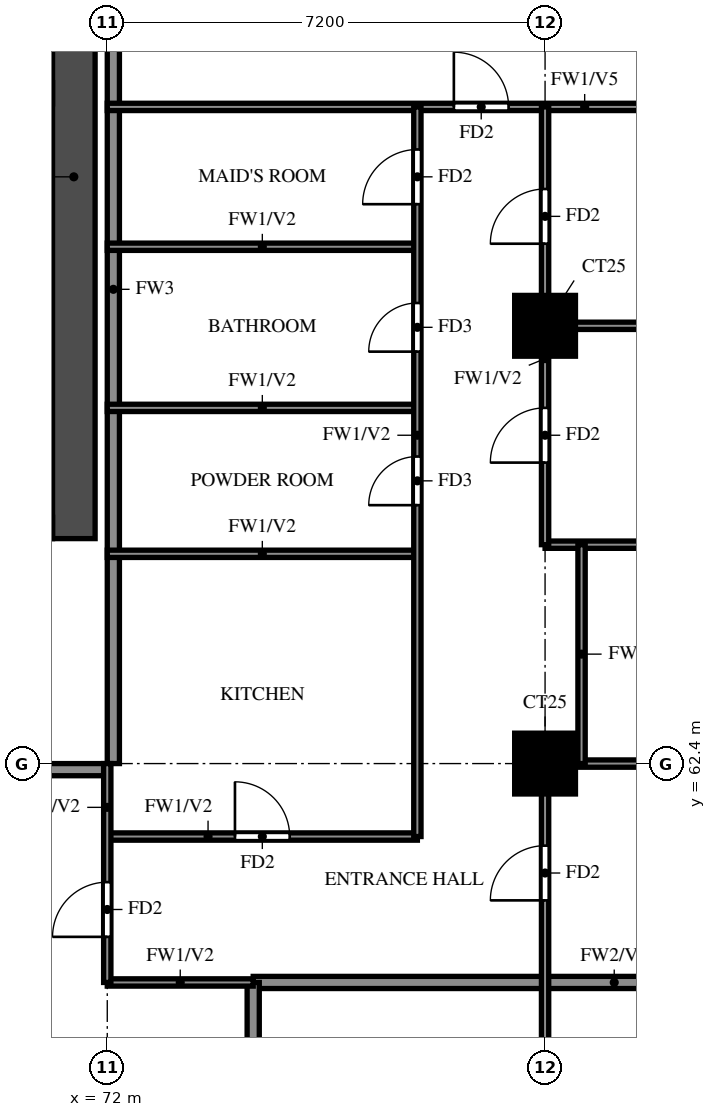
"""IFC4 building model, lengths in metres.
Left out: names, types, materials, properties, quantities, classifications, styles, units other than length and angle.
Written with IfcOpenShell. Run it as: python <this file> out.ifc"""

import sys

from ifc_helpers import new_model, si_unit, direction, frame, frame_2d, origin, origin_2d, place, context, subcontext, project, spatial, rectangle, extrude, source, transform, mapped, element, fill, save


model = new_model("IFC4")
c1 = context("Model", 3, precision=1e-05, world=origin(), true_north=direction((0.0, 1.0)))
c2 = subcontext(c1, "Body", "Model", "MODEL_VIEW")
j1 = project(units=[si_unit("LENGTHUNIT", "METRE"), si_unit("PLANEANGLEUNIT", "RADIAN")], contexts=[c1])
p1 = place(None, origin())
s1 = spatial("IfcSite", under=j1, at=p1, CompositionType="ELEMENT")
p2 = place(p1, origin())
s2 = spatial("IfcBuilding", under=s1, at=p2, CompositionType="ELEMENT")
p3 = place(p2, frame((0.0, 0.0, 146.5)))
s3 = spatial("IfcBuildingStorey", under=s2, at=p3, CompositionType="ELEMENT", Elevation=146.5)
m1 = source(origin(), c2, "Body", "SweptSolid", [
    extrude(rectangle(XDim=1.0, YDim=1.0, at=origin_2d()), origin(), (0.0, 0.0, 1.0), 3.2),
])
for number, where, z_axis, x_axis in (
    (1, (79.2, 62.4, 0.0), (0.0, 0.0, 1.0), (1.0, 0.0, 0.0)),
    (2, (79.2, 69.6, 0.0), (0.0, 0.0, 1.0), (1.0, 0.0, 0.0)),
):
    element("IfcColumn", number, at=place(p3, frame(where, z_axis=z_axis, x_axis=x_axis)), inside=s3, PredefinedType="COLUMN", context=c2, shape_type="MappedRepresentation", body=[
        mapped(m1, transform((0.0, 0.0, 0.0))),
    ])
p4 = place(p3, frame((71.45, 66.1, 0.0), z_axis=(0.0, 0.0, 1.0), x_axis=(0.0, 1.0, 0.0)))
e3 = element("IfcWall", 3, at=p4, inside=s3, PredefinedType="SHEAR", context=c2, shape_type="SweptSolid", body=[
    extrude(rectangle(XDim=11.9, YDim=0.7, at=frame_2d((5.95, 0.0))), origin(), (0.0, 0.0, 1.0), 3.2),
])
p5 = place(p3, frame((29.7, 66.275, 0.0), z_axis=(0.0, 0.0, 1.0), x_axis=(1.0, 0.0, 0.0)))
e4 = element("IfcWall", 4, at=p5, inside=s3, PredefinedType="SHEAR", context=c2, shape_type="SweptSolid", body=[
    extrude(rectangle(XDim=41.4, YDim=0.35, at=frame_2d((20.7, 0.0))), origin(), (0.0, 0.0, 1.0), 3.2),
])
p6 = place(p5, frame((0.925, 0.0, 0.0)))
e5 = element("IfcOpeningElement", 5, at=p6, cuts=e4, PredefinedType="OPENING", context=c2, shape_type="SweptSolid", body=[
    extrude(rectangle(XDim=1.1, YDim=2.1, at=frame_2d((0.55, 1.05))), frame((0.0, 0.185, 0.0), z_axis=(0.0, -1.0, 0.0), x_axis=(1.0, 0.0, 0.0)), (0.0, 0.0, 1.0), 0.37),
])
p7 = place(p5, frame((3.712, 0.0, 0.0)))
e6 = element("IfcOpeningElement", 6, at=p7, cuts=e4, PredefinedType="OPENING", context=c2, shape_type="SweptSolid", body=[
    extrude(rectangle(XDim=1.8, YDim=2.1, at=frame_2d((0.9, 1.05))), frame((0.0, 0.185, 0.0), z_axis=(0.0, -1.0, 0.0), x_axis=(1.0, 0.0, 0.0)), (0.0, 0.0, 1.0), 0.37),
])
p8 = place(p3, frame((67.2, 62.3, 0.0), z_axis=(0.0, 0.0, 1.0), x_axis=(1.0, 0.0, 0.0)))
e7 = element("IfcWall", 7, at=p8, inside=s3, PredefinedType="SOLIDWALL", context=c2, shape_type="SweptSolid", body=[
    extrude(rectangle(XDim=4.8, YDim=0.2, at=frame_2d((2.4, 0.0))), origin(), (0.0, 0.0, 1.0), 3.2),
])
p9 = place(p3, frame((72.1, 62.4, 0.0), z_axis=(0.0, 0.0, 1.0), x_axis=(0.0, 1.0, 0.0)))
e8 = element("IfcWall", 8, at=p9, inside=s3, PredefinedType="SOLIDWALL", context=c2, shape_type="SweptSolid", body=[
    extrude(rectangle(XDim=15.6, YDim=0.2, at=frame_2d((7.8, 0.0))), origin(), (0.0, 0.0, 1.0), 3.2),
])
p10 = place(p3, frame((74.4, 58.8, 0.0), z_axis=(0.0, 0.0, 1.0), x_axis=(1.0, 0.0, 0.0)))
e9 = element("IfcWall", 9, at=p10, inside=s3, PredefinedType="SOLIDWALL", context=c2, shape_type="SweptSolid", body=[
    extrude(rectangle(XDim=11.875, YDim=0.2, at=frame_2d((5.938, 0.0))), origin(), (0.0, 0.0, 1.0), 2.3),
])
p11 = place(p3, frame((74.4, 56.4, 0.0), z_axis=(0.0, 0.0, 1.0), x_axis=(0.0, 1.0, 0.0)))
e10 = element("IfcWall", 10, at=p11, inside=s3, PredefinedType="SOLIDWALL", context=c2, shape_type="SweptSolid", body=[
    extrude(rectangle(XDim=2.4, YDim=0.2, at=frame_2d((1.2, 0.0))), origin(), (0.0, 0.0, 1.0), 3.2),
])
p12 = place(p3, frame((72.0, 58.8, 0.0), z_axis=(0.0, 0.0, 1.0), x_axis=(1.0, 0.0, 0.0)))
e11 = element("IfcWall", 11, at=p12, inside=s3, PredefinedType="PARTITIONING", context=c2, shape_type="SweptSolid", body=[
    extrude(rectangle(XDim=2.4, YDim=0.12, at=frame_2d((1.2, 0.0))), origin(), (0.0, 0.0, 1.0), 3.2),
])
p13 = place(p3, frame((72.0, 61.2, 0.0), z_axis=(0.0, 0.0, 1.0), x_axis=(1.0, 0.0, 0.0)))
e12 = element("IfcWall", 12, at=p13, inside=s3, PredefinedType="PARTITIONING", context=c2, shape_type="SweptSolid", body=[
    extrude(rectangle(XDim=5.1, YDim=0.12, at=frame_2d((2.55, 0.0))), origin(), (0.0, 0.0, 1.0), 3.2),
])
p14 = place(p13, frame((2.1, 0.0, 0.0)))
e13 = element("IfcOpeningElement", 13, at=p14, cuts=e12, PredefinedType="OPENING", context=c2, shape_type="SweptSolid", body=[
    extrude(rectangle(XDim=0.9, YDim=2.1, at=frame_2d((0.45, 1.05))), frame((0.0, 0.07, 0.0), z_axis=(0.0, -1.0, 0.0), x_axis=(1.0, 0.0, 0.0)), (0.0, 0.0, 1.0), 0.14),
])
p15 = place(p3, frame((79.2, 62.4, 0.0), z_axis=(0.0, 0.0, 1.0), x_axis=(1.0, 0.0, 0.0)))
e14 = element("IfcWall", 14, at=p15, inside=s3, PredefinedType="PARTITIONING", context=c2, shape_type="SweptSolid", body=[
    extrude(rectangle(XDim=7.075, YDim=0.12, at=frame_2d((3.538, 0.0))), origin(), (0.0, 0.0, 1.0), 3.2),
])
p16 = place(p15, frame((3.438, 0.0, 0.0)))
e15 = element("IfcOpeningElement", 15, at=p16, cuts=e14, PredefinedType="OPENING", context=c2, shape_type="SweptSolid", body=[
    extrude(rectangle(XDim=0.8, YDim=2.1, at=frame_2d((0.4, 1.05))), frame((0.0, 0.07, 0.0), z_axis=(0.0, -1.0, 0.0), x_axis=(1.0, 0.0, 0.0)), (0.0, 0.0, 1.0), 0.14),
])
p17 = place(p3, frame((72.0, 65.85, 0.0), z_axis=(0.0, 0.0, 1.0), x_axis=(1.0, 0.0, 0.0)))
e16 = element("IfcWall", 16, at=p17, inside=s3, PredefinedType="PARTITIONING", context=c2, shape_type="SweptSolid", body=[
    extrude(rectangle(XDim=5.1, YDim=0.12, at=frame_2d((2.55, 0.0))), origin(), (0.0, 0.0, 1.0), 3.2),
])
p18 = place(p3, frame((79.2, 66.0, 0.0), z_axis=(0.0, 0.0, 1.0), x_axis=(1.0, 0.0, 0.0)))
e17 = element("IfcWall", 17, at=p18, inside=s3, PredefinedType="PARTITIONING", context=c2, shape_type="SweptSolid", body=[
    extrude(rectangle(XDim=7.075, YDim=0.12, at=frame_2d((3.538, 0.0))), origin(), (0.0, 0.0, 1.0), 2.3),
])
p19 = place(p3, frame((72.0, 68.25, 0.0), z_axis=(0.0, 0.0, 1.0), x_axis=(1.0, 0.0, 0.0)))
e18 = element("IfcWall", 18, at=p19, inside=s3, PredefinedType="PARTITIONING", context=c2, shape_type="SweptSolid", body=[
    extrude(rectangle(XDim=5.1, YDim=0.12, at=frame_2d((2.55, 0.0))), origin(), (0.0, 0.0, 1.0), 3.2),
])
p20 = place(p3, frame((79.2, 69.6, 0.0), z_axis=(0.0, 0.0, 1.0), x_axis=(1.0, 0.0, 0.0)))
e19 = element("IfcWall", 19, at=p20, inside=s3, PredefinedType="PARTITIONING", context=c2, shape_type="SweptSolid", body=[
    extrude(rectangle(XDim=7.075, YDim=0.12, at=frame_2d((3.538, 0.0))), origin(), (0.0, 0.0, 1.0), 3.2),
])
p21 = place(p3, frame((72.0, 70.9, 0.0), z_axis=(0.0, 0.0, 1.0), x_axis=(1.0, 0.0, 0.0)))
e20 = element("IfcWall", 20, at=p21, inside=s3, PredefinedType="PARTITIONING", context=c2, shape_type="SweptSolid", body=[
    extrude(rectangle(XDim=5.1, YDim=0.12, at=frame_2d((2.55, 0.0))), origin(), (0.0, 0.0, 1.0), 3.2),
])
p22 = place(p3, frame((72.0, 73.2, 0.0), z_axis=(0.0, 0.0, 1.0), x_axis=(1.0, 0.0, 0.0)))
e21 = element("IfcWall", 21, at=p22, inside=s3, PredefinedType="PARTITIONING", context=c2, shape_type="SweptSolid", body=[
    extrude(rectangle(XDim=14.275, YDim=0.12, at=frame_2d((7.137, 0.0))), origin(), (0.0, 0.0, 1.0), 2.3),
])
p23 = place(p22, frame((5.7, 0.0, 0.0)))
e22 = element("IfcOpeningElement", 22, at=p23, cuts=e21, PredefinedType="OPENING", context=c2, shape_type="SweptSolid", body=[
    extrude(rectangle(XDim=0.9, YDim=2.1, at=frame_2d((0.45, 1.05))), frame((0.0, 0.07, 0.0), z_axis=(0.0, -1.0, 0.0), x_axis=(1.0, 0.0, 0.0)), (0.0, 0.0, 1.0), 0.14),
])
p24 = place(p3, frame((72.0, 58.8, 0.0), z_axis=(0.0, 0.0, 1.0), x_axis=(0.0, 1.0, 0.0)))
e23 = element("IfcWall", 23, at=p24, inside=s3, PredefinedType="PARTITIONING", context=c2, shape_type="SweptSolid", body=[
    extrude(rectangle(XDim=3.6, YDim=0.12, at=frame_2d((1.8, 0.0))), origin(), (0.0, 0.0, 1.0), 3.2),
])
p25 = place(p24, frame((0.75, 0.0, 0.0)))
e24 = element("IfcOpeningElement", 24, at=p25, cuts=e23, PredefinedType="OPENING", context=c2, shape_type="SweptSolid", body=[
    extrude(rectangle(XDim=0.9, YDim=2.1, at=frame_2d((0.45, 1.05))), frame((0.0, 0.07, 0.0), z_axis=(0.0, -1.0, 0.0), x_axis=(1.0, 0.0, 0.0)), (0.0, 0.0, 1.0), 0.14),
])
p26 = place(p3, frame((77.1, 61.2, 0.0), z_axis=(0.0, 0.0, 1.0), x_axis=(0.0, 1.0, 0.0)))
e25 = element("IfcWall", 25, at=p26, inside=s3, PredefinedType="PARTITIONING", context=c2, shape_type="SweptSolid", body=[
    extrude(rectangle(XDim=12.0, YDim=0.12, at=frame_2d((6.0, 0.0))), origin(), (0.0, 0.0, 1.0), 3.2),
])
p27 = place(p26, frame((5.45, 0.0, 0.0)))
e26 = element("IfcOpeningElement", 26, at=p27, cuts=e25, PredefinedType="OPENING", context=c2, shape_type="SweptSolid", body=[
    extrude(rectangle(XDim=0.8, YDim=2.1, at=frame_2d((0.4, 1.05))), frame((0.0, 0.07, 0.0), z_axis=(0.0, -1.0, 0.0), x_axis=(1.0, 0.0, 0.0)), (0.0, 0.0, 1.0), 0.14),
])
p28 = place(p26, frame((7.975, 0.0, 0.0)))
e27 = element("IfcOpeningElement", 27, at=p28, cuts=e25, PredefinedType="OPENING", context=c2, shape_type="SweptSolid", body=[
    extrude(rectangle(XDim=0.8, YDim=2.1, at=frame_2d((0.4, 1.05))), frame((0.0, 0.07, 0.0), z_axis=(0.0, -1.0, 0.0), x_axis=(1.0, 0.0, 0.0)), (0.0, 0.0, 1.0), 0.14),
])
p29 = place(p26, frame((10.4, 0.0, 0.0)))
e28 = element("IfcOpeningElement", 28, at=p29, cuts=e25, PredefinedType="OPENING", context=c2, shape_type="SweptSolid", body=[
    extrude(rectangle(XDim=0.9, YDim=2.1, at=frame_2d((0.45, 1.05))), frame((0.0, 0.07, 0.0), z_axis=(0.0, -1.0, 0.0), x_axis=(1.0, 0.0, 0.0)), (0.0, 0.0, 1.0), 0.14),
])
p30 = place(p3, frame((79.2, 48.125, 0.0), z_axis=(0.0, 0.0, 1.0), x_axis=(0.0, 1.0, 0.0)))
e29 = element("IfcWall", 29, at=p30, inside=s3, PredefinedType="PARTITIONING", context=c2, shape_type="SweptSolid", body=[
    extrude(rectangle(XDim=14.275, YDim=0.12, at=frame_2d((7.137, 0.0))), origin(), (0.0, 0.0, 1.0), 3.2),
])
p31 = place(p30, frame((1.288, 0.0, 0.0)))
e30 = element("IfcOpeningElement", 30, at=p31, cuts=e29, PredefinedType="OPENING", context=c2, shape_type="SweptSolid", body=[
    extrude(rectangle(XDim=0.9, YDim=2.1, at=frame_2d((0.45, 1.05))), frame((0.0, 0.07, 0.0), z_axis=(0.0, -1.0, 0.0), x_axis=(1.0, 0.0, 0.0)), (0.0, 0.0, 1.0), 0.14),
])
p32 = place(p30, frame((7.825, 0.0, 0.0)))
e31 = element("IfcOpeningElement", 31, at=p32, cuts=e29, PredefinedType="OPENING", context=c2, shape_type="SweptSolid", body=[
    extrude(rectangle(XDim=1.5, YDim=2.1, at=frame_2d((0.75, 1.05))), frame((0.0, 0.07, 0.0), z_axis=(0.0, -1.0, 0.0), x_axis=(1.0, 0.0, 0.0)), (0.0, 0.0, 1.0), 0.14),
])
p33 = place(p30, frame((12.025, 0.0, 0.0)))
e32 = element("IfcOpeningElement", 32, at=p33, cuts=e29, PredefinedType="OPENING", context=c2, shape_type="SweptSolid", body=[
    extrude(rectangle(XDim=0.9, YDim=2.1, at=frame_2d((0.45, 1.05))), frame((0.0, 0.07, 0.0), z_axis=(0.0, -1.0, 0.0), x_axis=(1.0, 0.0, 0.0)), (0.0, 0.0, 1.0), 0.14),
])
p34 = place(p3, frame((79.2, 66.0, 0.0), z_axis=(0.0, 0.0, 1.0), x_axis=(0.0, 1.0, 0.0)))
e33 = element("IfcWall", 33, at=p34, inside=s3, PredefinedType="PARTITIONING", context=c2, shape_type="SweptSolid", body=[
    extrude(rectangle(XDim=7.2, YDim=0.12, at=frame_2d((3.6, 0.0))), origin(), (0.0, 0.0, 1.0), 3.2),
])
p35 = place(p34, frame((1.35, 0.0, 0.0)))
e34 = element("IfcOpeningElement", 34, at=p35, cuts=e33, PredefinedType="OPENING", context=c2, shape_type="SweptSolid", body=[
    extrude(rectangle(XDim=0.9, YDim=2.1, at=frame_2d((0.45, 1.05))), frame((0.0, 0.07, 0.0), z_axis=(0.0, -1.0, 0.0), x_axis=(1.0, 0.0, 0.0)), (0.0, 0.0, 1.0), 0.14),
])
p36 = place(p34, frame((4.95, 0.0, 0.0)))
e35 = element("IfcOpeningElement", 35, at=p36, cuts=e33, PredefinedType="OPENING", context=c2, shape_type="SweptSolid", body=[
    extrude(rectangle(XDim=0.9, YDim=2.1, at=frame_2d((0.45, 1.05))), frame((0.0, 0.07, 0.0), z_axis=(0.0, -1.0, 0.0), x_axis=(1.0, 0.0, 0.0)), (0.0, 0.0, 1.0), 0.14),
])
p37 = place(p3, frame((79.8, 62.4, 0.0), z_axis=(0.0, 0.0, 1.0), x_axis=(0.0, 1.0, 0.0)))
e36 = element("IfcWall", 36, at=p37, inside=s3, PredefinedType="PARTITIONING", context=c2, shape_type="SweptSolid", body=[
    extrude(rectangle(XDim=3.6, YDim=0.12, at=frame_2d((1.8, 0.0))), origin(), (0.0, 0.0, 1.0), 3.2),
])
p38 = place(p25, origin())
e37 = element("IfcDoor", 37, at=p38, inside=s3, OperationType="SINGLE_SWING_LEFT", PredefinedType="DOOR", context=c2, shape_type="SweptSolid", body=[
    extrude(rectangle(XDim=0.9, YDim=2.1, at=frame_2d((0.45, 1.05))), frame((0.0, 0.025, 0.0), z_axis=(0.0, -1.0, 0.0), x_axis=(1.0, 0.0, 0.0)), (0.0, 0.0, 1.0), 0.05),
])
fill(e24, e37)
p39 = place(p33, origin())
e38 = element("IfcDoor", 38, at=p39, inside=s3, OperationType="SINGLE_SWING_RIGHT", PredefinedType="DOOR", context=c2, shape_type="SweptSolid", body=[
    extrude(rectangle(XDim=0.9, YDim=2.1, at=frame_2d((0.45, 1.05))), frame((0.0, 0.025, 0.0), z_axis=(0.0, -1.0, 0.0), x_axis=(1.0, 0.0, 0.0)), (0.0, 0.0, 1.0), 0.05),
])
fill(e32, e38)
p40 = place(p35, origin())
e39 = element("IfcDoor", 39, at=p40, inside=s3, OperationType="SINGLE_SWING_LEFT", PredefinedType="DOOR", context=c2, shape_type="SweptSolid", body=[
    extrude(rectangle(XDim=0.9, YDim=2.1, at=frame_2d((0.45, 1.05))), frame((0.0, 0.025, 0.0), z_axis=(0.0, -1.0, 0.0), x_axis=(1.0, 0.0, 0.0)), (0.0, 0.0, 1.0), 0.05),
])
fill(e34, e39)
p41 = place(p36, origin())
e40 = element("IfcDoor", 40, at=p41, inside=s3, OperationType="SINGLE_SWING_RIGHT", PredefinedType="DOOR", context=c2, shape_type="SweptSolid", body=[
    extrude(rectangle(XDim=0.9, YDim=2.1, at=frame_2d((0.45, 1.05))), frame((0.0, 0.025, 0.0), z_axis=(0.0, -1.0, 0.0), x_axis=(1.0, 0.0, 0.0)), (0.0, 0.0, 1.0), 0.05),
])
fill(e35, e40)
p42 = place(p23, origin())
e41 = element("IfcDoor", 41, at=p42, inside=s3, OperationType="SINGLE_SWING_LEFT", PredefinedType="DOOR", context=c2, shape_type="SweptSolid", body=[
    extrude(rectangle(XDim=0.9, YDim=2.1, at=frame_2d((0.45, 1.05))), frame((0.0, 0.025, 0.0), z_axis=(0.0, -1.0, 0.0), x_axis=(1.0, 0.0, 0.0)), (0.0, 0.0, 1.0), 0.05),
])
fill(e22, e41)
p43 = place(p14, origin())
e42 = element("IfcDoor", 42, at=p43, inside=s3, OperationType="SINGLE_SWING_LEFT", PredefinedType="DOOR", context=c2, shape_type="SweptSolid", body=[
    extrude(rectangle(XDim=0.9, YDim=2.1, at=frame_2d((0.45, 1.05))), frame((0.0, 0.025, 0.0), z_axis=(0.0, -1.0, 0.0), x_axis=(1.0, 0.0, 0.0)), (0.0, 0.0, 1.0), 0.05),
])
fill(e13, e42)
p44 = place(p27, origin())
e43 = element("IfcDoor", 43, at=p44, inside=s3, OperationType="SINGLE_SWING_RIGHT", PredefinedType="DOOR", context=c2, shape_type="SweptSolid", body=[
    extrude(rectangle(XDim=0.8, YDim=2.1, at=frame_2d((0.4, 1.05))), frame((0.0, 0.025, 0.0), z_axis=(0.0, -1.0, 0.0), x_axis=(1.0, 0.0, 0.0)), (0.0, 0.0, 1.0), 0.05),
])
fill(e26, e43)
p45 = place(p28, origin())
e44 = element("IfcDoor", 44, at=p45, inside=s3, OperationType="SINGLE_SWING_LEFT", PredefinedType="DOOR", context=c2, shape_type="SweptSolid", body=[
    extrude(rectangle(XDim=0.8, YDim=2.1, at=frame_2d((0.4, 1.05))), frame((0.0, 0.025, 0.0), z_axis=(0.0, -1.0, 0.0), x_axis=(1.0, 0.0, 0.0)), (0.0, 0.0, 1.0), 0.05),
])
fill(e27, e44)
p46 = place(p29, origin())
e45 = element("IfcDoor", 45, at=p46, inside=s3, OperationType="SINGLE_SWING_LEFT", PredefinedType="DOOR", context=c2, shape_type="SweptSolid", body=[
    extrude(rectangle(XDim=0.9, YDim=2.1, at=frame_2d((0.45, 1.05))), frame((0.0, 0.025, 0.0), z_axis=(0.0, -1.0, 0.0), x_axis=(1.0, 0.0, 0.0)), (0.0, 0.0, 1.0), 0.05),
])
fill(e28, e45)
save(model, sys.argv[1])
